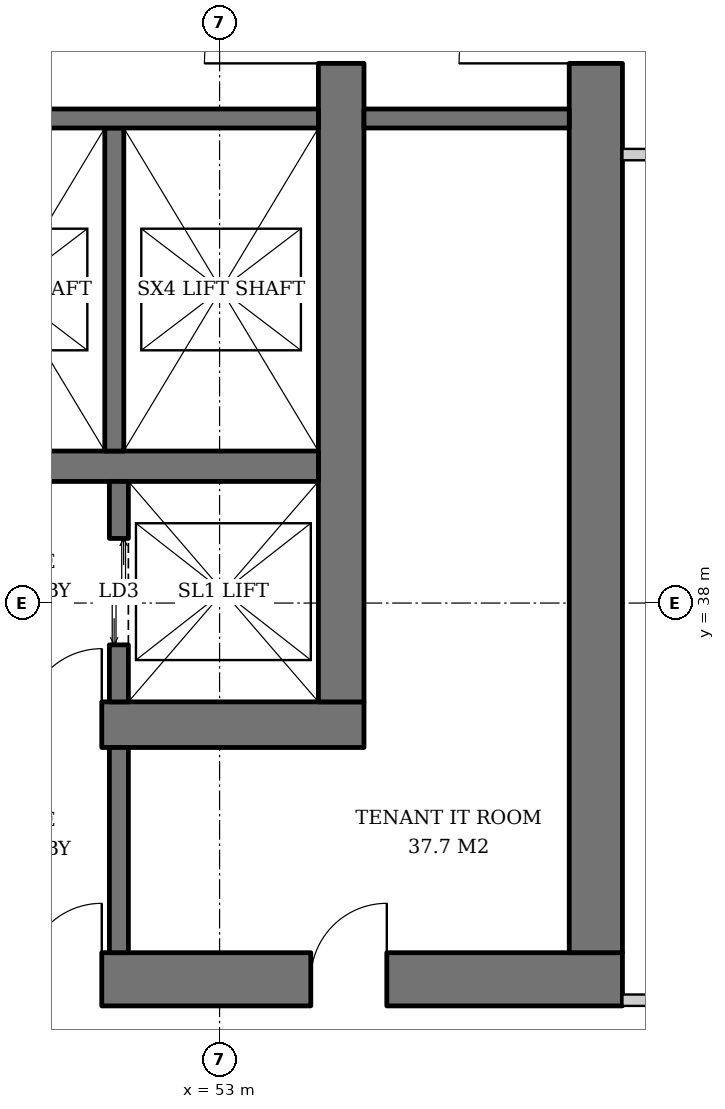
"""IFC4 building model, lengths in metres.
Left out: names, types, materials, properties, quantities, classifications, styles, units other than length and angle.
Written with IfcOpenShell. Run it as: python <this file> out.ifc"""

import sys

from ifc_helpers import new_model, si_unit, direction, frame, frame_2d, origin, place, context, subcontext, project, spatial, rectangle, extrude, element, fill, save


model = new_model("IFC4")
c1 = context("Model", 3, precision=1e-05, world=origin(), true_north=direction((0.0, 1.0)))
c2 = subcontext(c1, "Body", "Model", "MODEL_VIEW")
j1 = project(units=[si_unit("LENGTHUNIT", "METRE"), si_unit("PLANEANGLEUNIT", "RADIAN")], contexts=[c1])
p1 = place(None, origin())
s1 = spatial("IfcSite", under=j1, at=p1, CompositionType="ELEMENT")
p2 = place(p1, origin())
s2 = spatial("IfcBuilding", under=s1, at=p2, CompositionType="ELEMENT")
p3 = place(p2, frame((0.0, 0.0, 108.4)))
s3 = spatial("IfcBuildingStorey", under=s2, at=p3, CompositionType="ELEMENT", Elevation=108.4)
p4 = place(p3, frame((35.1, 36.4, 0.0), z_axis=(0.0, 0.0, 1.0), x_axis=(1.0, 0.0, 0.0)))
e1 = element("IfcWall", 1, at=p4, inside=s3, PredefinedType="SHEAR", context=c2, shape_type="SweptSolid", body=[
    extrude(rectangle(XDim=19.8, YDim=0.6, at=frame_2d((9.9, 0.0))), origin(), (0.0, 0.0, 1.0), 3.8),
])
p5 = place(p4, frame((3.9, 0.0, 0.0)))
e2 = element("IfcOpeningElement", 2, at=p5, cuts=e1, PredefinedType="OPENING", context=c2, shape_type="SweptSolid", body=[
    extrude(rectangle(XDim=1.0, YDim=2.1, at=frame_2d((0.5, 1.05))), frame((0.0, 0.31, 0.0), z_axis=(0.0, -1.0, 0.0), x_axis=(1.0, 0.0, 0.0)), (0.0, 0.0, 1.0), 0.62),
])
p6 = place(p4, frame((15.35, 0.0, 0.0)))
e3 = element("IfcOpeningElement", 3, at=p6, cuts=e1, PredefinedType="OPENING", context=c2, shape_type="SweptSolid", body=[
    extrude(rectangle(XDim=1.0, YDim=2.1, at=frame_2d((0.5, 1.05))), frame((0.0, 0.31, 0.0), z_axis=(0.0, -1.0, 0.0), x_axis=(1.0, 0.0, 0.0)), (0.0, 0.0, 1.0), 0.62),
])
p7 = place(p3, frame((54.6, 36.7, 0.0), z_axis=(0.0, 0.0, 1.0), x_axis=(0.0, 1.0, 0.0)))
e4 = element("IfcWall", 4, at=p7, inside=s3, PredefinedType="SHEAR", context=c2, shape_type="SweptSolid", body=[
    extrude(rectangle(XDim=18.6, YDim=0.6, at=frame_2d((9.3, 0.0))), origin(), (0.0, 0.0, 1.0), 3.8),
])
p8 = place(p7, frame((8.4, 0.0, 0.0)))
e5 = element("IfcOpeningElement", 5, at=p8, cuts=e4, PredefinedType="OPENING", context=c2, shape_type="SweptSolid", body=[
    extrude(rectangle(XDim=1.8, YDim=2.4, at=frame_2d((0.9, 1.2))), frame((0.0, 0.31, 0.0), z_axis=(0.0, -1.0, 0.0), x_axis=(1.0, 0.0, 0.0)), (0.0, 0.0, 1.0), 0.62),
])
p9 = place(p3, frame((31.7, 33.05, 0.0), z_axis=(0.0, 0.0, 1.0), x_axis=(1.0, 0.0, 0.0)))
e6 = element("IfcWall", 6, at=p9, inside=s3, PredefinedType="SHEAR", context=c2, shape_type="SweptSolid", body=[
    extrude(rectangle(XDim=26.6, YDim=0.7, at=frame_2d((13.3, 0.0))), origin(), (0.0, 0.0, 1.0), 3.8),
])
p10 = place(p9, frame((7.3, 0.0, 0.0)))
e7 = element("IfcOpeningElement", 7, at=p10, cuts=e6, PredefinedType="OPENING", context=c2, shape_type="SweptSolid", body=[
    extrude(rectangle(XDim=1.0, YDim=2.1, at=frame_2d((0.5, 1.05))), frame((0.0, 0.36, 0.0), z_axis=(0.0, -1.0, 0.0), x_axis=(1.0, 0.0, 0.0)), (0.0, 0.0, 1.0), 0.72),
])
p11 = place(p9, frame((18.75, 0.0, 0.0)))
e8 = element("IfcOpeningElement", 8, at=p11, cuts=e6, PredefinedType="OPENING", context=c2, shape_type="SweptSolid", body=[
    extrude(rectangle(XDim=1.0, YDim=2.1, at=frame_2d((0.5, 1.05))), frame((0.0, 0.36, 0.0), z_axis=(0.0, -1.0, 0.0), x_axis=(1.0, 0.0, 0.0)), (0.0, 0.0, 1.0), 0.72),
])
p12 = place(p9, frame((3.2, 0.0, 0.0)))
e9 = element("IfcOpeningElement", 9, at=p12, cuts=e6, PredefinedType="OPENING", context=c2, shape_type="SweptSolid", body=[
    extrude(rectangle(XDim=1.0, YDim=2.1, at=frame_2d((0.5, 1.05))), frame((0.0, 0.36, 0.0), z_axis=(0.0, -1.0, 0.0), x_axis=(1.0, 0.0, 0.0)), (0.0, 0.0, 1.0), 0.72),
])
p13 = place(p9, frame((10.42, 0.0, 0.0)))
e10 = element("IfcOpeningElement", 10, at=p13, cuts=e6, PredefinedType="OPENING", context=c2, shape_type="SweptSolid", body=[
    extrude(rectangle(XDim=1.0, YDim=2.1, at=frame_2d((0.5, 1.05))), frame((0.0, 0.36, 0.0), z_axis=(0.0, -1.0, 0.0), x_axis=(1.0, 0.0, 0.0)), (0.0, 0.0, 1.0), 0.72),
])
p14 = place(p9, frame((14.46, 0.0, 0.0)))
e11 = element("IfcOpeningElement", 11, at=p14, cuts=e6, PredefinedType="OPENING", context=c2, shape_type="SweptSolid", body=[
    extrude(rectangle(XDim=1.0, YDim=2.1, at=frame_2d((0.5, 1.05))), frame((0.0, 0.36, 0.0), z_axis=(0.0, -1.0, 0.0), x_axis=(1.0, 0.0, 0.0)), (0.0, 0.0, 1.0), 0.72),
])
p15 = place(p9, frame((22.5, 0.0, 0.0)))
e12 = element("IfcOpeningElement", 12, at=p15, cuts=e6, PredefinedType="OPENING", context=c2, shape_type="SweptSolid", body=[
    extrude(rectangle(XDim=1.0, YDim=2.1, at=frame_2d((0.5, 1.05))), frame((0.0, 0.36, 0.0), z_axis=(0.0, -1.0, 0.0), x_axis=(1.0, 0.0, 0.0)), (0.0, 0.0, 1.0), 0.72),
])
p16 = place(p3, frame((57.95, 33.4, 0.0), z_axis=(0.0, 0.0, 1.0), x_axis=(0.0, 1.0, 0.0)))
e13 = element("IfcWall", 13, at=p16, inside=s3, PredefinedType="SHEAR", context=c2, shape_type="SweptSolid", body=[
    extrude(rectangle(XDim=25.2, YDim=0.7, at=frame_2d((12.6, 0.0))), origin(), (0.0, 0.0, 1.0), 3.8),
])
p17 = place(p16, frame((11.7, 0.0, 0.0)))
e14 = element("IfcOpeningElement", 14, at=p17, cuts=e13, PredefinedType="OPENING", context=c2, shape_type="SweptSolid", body=[
    extrude(rectangle(XDim=1.8, YDim=2.4, at=frame_2d((0.9, 1.2))), frame((0.0, 0.36, 0.0), z_axis=(0.0, -1.0, 0.0), x_axis=(1.0, 0.0, 0.0)), (0.0, 0.0, 1.0), 0.72),
])
p18 = place(p3, frame((35.7, 39.8, 0.0), z_axis=(0.0, 0.0, 1.0), x_axis=(1.0, 0.0, 0.0)))
e15 = element("IfcWall", 15, at=p18, inside=s3, PredefinedType="SHEAR", context=c2, shape_type="SweptSolid", body=[
    extrude(rectangle(XDim=18.6, YDim=0.4, at=frame_2d((9.3, 0.0))), origin(), (0.0, 0.0, 1.0), 3.8),
])
p19 = place(p3, frame((51.675, 36.7, 0.0), z_axis=(0.0, 0.0, 1.0), x_axis=(0.0, 1.0, 0.0)))
e16 = element("IfcWall", 16, at=p19, inside=s3, PredefinedType="SHEAR", context=c2, shape_type="SweptSolid", body=[
    extrude(rectangle(XDim=2.9, YDim=0.25, at=frame_2d((1.45, 0.0))), origin(), (0.0, 0.0, 1.0), 3.8),
])
p20 = place(p19, frame((0.75, 0.0, 0.0)))
e17 = element("IfcOpeningElement", 17, at=p20, cuts=e16, PredefinedType="OPENING", context=c2, shape_type="SweptSolid", body=[
    extrude(rectangle(XDim=1.4, YDim=2.4, at=frame_2d((0.7, 1.2))), frame((0.0, 0.135, 0.0), z_axis=(0.0, -1.0, 0.0), x_axis=(1.0, 0.0, 0.0)), (0.0, 0.0, 1.0), 0.27),
])
p21 = place(p3, frame((51.615, 44.25, 0.0), z_axis=(0.0, 0.0, 1.0), x_axis=(0.0, -1.0, 0.0)))
e18 = element("IfcWall", 18, at=p21, inside=s3, PredefinedType="SHEAR", context=c2, shape_type="SweptSolid", body=[
    extrude(rectangle(XDim=4.25, YDim=0.25, at=frame_2d((2.125, 0.0))), origin(), (0.0, 0.0, 1.0), 3.8),
])
p22 = place(p3, frame((48.93, 44.375, 0.0), z_axis=(0.0, 0.0, 1.0), x_axis=(1.0, 0.0, 0.0)))
e19 = element("IfcWall", 19, at=p22, inside=s3, PredefinedType="SHEAR", context=c2, shape_type="SweptSolid", body=[
    extrude(rectangle(XDim=5.37, YDim=0.25, at=frame_2d((2.685, 0.0))), origin(), (0.0, 0.0, 1.0), 3.8),
])
for number, where, z_axis, x_axis in (
    (20, (54.9, 44.375, 0.0), (0.0, 0.0, 1.0), (1.0, 0.0, 0.0)),
    (21, (51.675, 33.4, 0.0), (0.0, 0.0, 1.0), (0.0, 1.0, 0.0)),
):
    element("IfcWall", number, at=place(p3, frame(where, z_axis=z_axis, x_axis=x_axis)), inside=s3, PredefinedType="SOLIDWALL", context=c2, shape_type="SweptSolid", body=[
        extrude(rectangle(XDim=2.7, YDim=0.25, at=frame_2d((1.35, 0.0))), origin(), (0.0, 0.0, 1.0), 3.62),
    ])
for number, where, z_axis, x_axis in (
    (22, (58.3, 32.775, 0.0), (0.0, 0.0, 1.0), (1.0, 0.0, 0.0)),
    (23, (58.3, 43.9, 0.0), (0.0, 0.0, 1.0), (1.0, 0.0, 0.0)),
):
    element("IfcWall", number, at=place(p3, frame(where, z_axis=z_axis, x_axis=x_axis)), inside=s3, PredefinedType="PARTITIONING", context=c2, shape_type="SweptSolid", body=[
        extrude(rectangle(XDim=1.725, YDim=0.15, at=frame_2d((0.862, 0.0))), origin(), (0.0, 0.0, 1.0), 3.62),
    ])
p23 = place(p20, origin())
e24 = element("IfcDoor", 24, at=p23, inside=s3, OperationType="DOUBLE_DOOR_SLIDING", PredefinedType="DOOR", context=c2, shape_type="SweptSolid", body=[
    extrude(rectangle(XDim=1.4, YDim=2.4, at=frame_2d((0.7, 1.2))), frame((0.0, 0.025, 0.0), z_axis=(0.0, -1.0, 0.0), x_axis=(1.0, 0.0, 0.0)), (0.0, 0.0, 1.0), 0.05),
])
fill(e17, e24)
p24 = place(p8, origin())
e25 = element("IfcDoor", 25, at=p24, inside=s3, OperationType="DOUBLE_DOOR_SINGLE_SWING", PredefinedType="DOOR", context=c2, shape_type="SweptSolid", body=[
    extrude(rectangle(XDim=1.8, YDim=2.4, at=frame_2d((0.9, 1.2))), frame((0.0, 0.025, 0.0), z_axis=(0.0, -1.0, 0.0), x_axis=(1.0, 0.0, 0.0)), (0.0, 0.0, 1.0), 0.05),
])
fill(e5, e25)
p25 = place(p6, origin())
e26 = element("IfcDoor", 26, at=p25, inside=s3, OperationType="SINGLE_SWING_RIGHT", PredefinedType="DOOR", context=c2, shape_type="SweptSolid", body=[
    extrude(rectangle(XDim=1.0, YDim=2.1, at=frame_2d((0.5, 1.05))), frame((0.0, 0.025, 0.0), z_axis=(0.0, -1.0, 0.0), x_axis=(1.0, 0.0, 0.0)), (0.0, 0.0, 1.0), 0.05),
])
fill(e3, e26)
p26 = place(p17, origin())
e27 = element("IfcDoor", 27, at=p26, inside=s3, OperationType="DOUBLE_DOOR_SINGLE_SWING", PredefinedType="DOOR", context=c2, shape_type="SweptSolid", body=[
    extrude(rectangle(XDim=1.8, YDim=2.4, at=frame_2d((0.9, 1.2))), frame((0.0, 0.025, 0.0), z_axis=(0.0, -1.0, 0.0), x_axis=(1.0, 0.0, 0.0)), (0.0, 0.0, 1.0), 0.05),
])
fill(e14, e27)
p27 = place(p11, origin())
e28 = element("IfcDoor", 28, at=p27, inside=s3, OperationType="SINGLE_SWING_RIGHT", PredefinedType="DOOR", context=c2, shape_type="SweptSolid", body=[
    extrude(rectangle(XDim=1.0, YDim=2.1, at=frame_2d((0.5, 1.05))), frame((0.0, 0.025, 0.0), z_axis=(0.0, -1.0, 0.0), x_axis=(1.0, 0.0, 0.0)), (0.0, 0.0, 1.0), 0.05),
])
fill(e8, e28)
p28 = place(p15, origin())
e29 = element("IfcDoor", 29, at=p28, inside=s3, OperationType="SINGLE_SWING_RIGHT", PredefinedType="DOOR", context=c2, shape_type="SweptSolid", body=[
    extrude(rectangle(XDim=1.0, YDim=2.1, at=frame_2d((0.5, 1.05))), frame((0.0, 0.34, 0.0), z_axis=(0.0, -1.0, 0.0), x_axis=(1.0, 0.0, 0.0)), (0.0, 0.0, 1.0), 0.05),
])
fill(e12, e29)
save(model, sys.argv[1])
